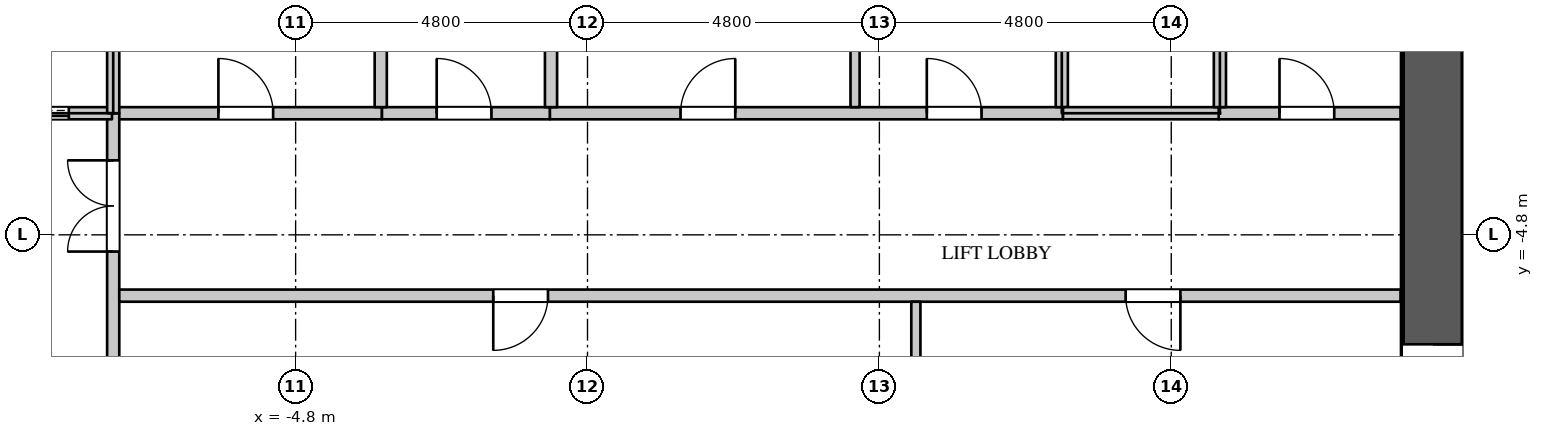
"""IFC4 building model, lengths in metres.
Left out: names, types, materials, properties, quantities, classifications, styles, units other than length and angle.
Written with IfcOpenShell. Run it as: python <this file> out.ifc"""

import sys

from ifc_helpers import new_model, si_unit, direction, frame, frame_2d, origin, place, context, subcontext, project, spatial, rectangle, extrude, element, fill, save


model = new_model("IFC4")
c1 = context("Model", 3, precision=1e-05, world=origin(), true_north=direction((0.0, 1.0)))
c2 = subcontext(c1, "Body", "Model", "MODEL_VIEW")
j1 = project(units=[si_unit("LENGTHUNIT", "METRE"), si_unit("PLANEANGLEUNIT", "RADIAN")], contexts=[c1])
p1 = place(None, origin())
s1 = spatial("IfcSite", under=j1, at=p1, CompositionType="ELEMENT")
p2 = place(p1, origin())
s2 = spatial("IfcBuilding", under=s1, at=p2, CompositionType="ELEMENT")
p3 = place(p2, frame((0.0, 0.0, 101.1)))
s3 = spatial("IfcBuildingStorey", under=s2, at=p3, CompositionType="ELEMENT", Elevation=101.1)
p4 = place(p3, frame((13.9, -11.0, 0.0), z_axis=(0.0, 0.0, 1.0), x_axis=(0.0, 1.0, 0.0)))
e1 = element("IfcWall", 1, at=p4, inside=s3, PredefinedType="SHEAR", context=c2, shape_type="SweptSolid", body=[
    extrude(rectangle(XDim=22.0, YDim=1.0, at=frame_2d((11.0, 0.0))), origin(), (0.0, 0.0, 1.0), 5.4),
])
p5 = place(p4, frame((20.05, 0.0, 0.0)))
e2 = element("IfcOpeningElement", 2, at=p5, cuts=e1, PredefinedType="OPENING", context=c2, shape_type="SweptSolid", body=[
    extrude(rectangle(XDim=1.1, YDim=2.2, at=frame_2d((0.55, 1.1))), frame((0.0, 0.51, 0.0), z_axis=(0.0, -1.0, 0.0), x_axis=(1.0, 0.0, 0.0)), (0.0, 0.0, 1.0), 1.02),
])
p6 = place(p4, frame((14.15, 0.0, 0.0)))
e3 = element("IfcOpeningElement", 3, at=p6, cuts=e1, PredefinedType="OPENING", context=c2, shape_type="SweptSolid", body=[
    extrude(rectangle(XDim=0.9, YDim=2.2, at=frame_2d((0.45, 1.1))), frame((0.0, 0.51, 0.0), z_axis=(0.0, -1.0, 0.0), x_axis=(1.0, 0.0, 0.0)), (0.0, 0.0, 1.0), 1.02),
])
p7 = place(p4, frame((0.85, 0.0, 0.0)))
e4 = element("IfcOpeningElement", 4, at=p7, cuts=e1, PredefinedType="OPENING", context=c2, shape_type="SweptSolid", body=[
    extrude(rectangle(XDim=1.1, YDim=2.2, at=frame_2d((0.55, 1.1))), frame((0.0, 0.51, 0.0), z_axis=(0.0, -1.0, 0.0), x_axis=(1.0, 0.0, 0.0)), (0.0, 0.0, 1.0), 1.02),
])
p8 = place(p4, frame((3.5, 0.0, 0.0)))
e5 = element("IfcOpeningElement", 5, at=p8, cuts=e1, PredefinedType="OPENING", context=c2, shape_type="SweptSolid", body=[
    extrude(rectangle(XDim=0.9, YDim=2.2, at=frame_2d((0.45, 1.1))), frame((0.0, 0.51, 0.0), z_axis=(0.0, -1.0, 0.0), x_axis=(1.0, 0.0, 0.0)), (0.0, 0.0, 1.0), 1.02),
])
p9 = place(p3, frame((-7.82, -2.8, 0.0), z_axis=(0.0, 0.0, 1.0), x_axis=(1.0, 0.0, 0.0)))
e6 = element("IfcWall", 6, at=p9, inside=s3, PredefinedType="PARTITIONING", context=c2, shape_type="SweptSolid", body=[
    extrude(rectangle(XDim=4.44, YDim=0.2, at=frame_2d((2.22, 0.0))), origin(), (0.0, 0.0, 1.0), 5.15),
])
p10 = place(p9, frame((1.75, 0.0, 0.0)))
e7 = element("IfcOpeningElement", 7, at=p10, cuts=e6, PredefinedType="OPENING", context=c2, shape_type="SweptSolid", body=[
    extrude(rectangle(XDim=0.9, YDim=2.2, at=frame_2d((0.45, 1.1))), frame((0.0, 0.11, 0.0), z_axis=(0.0, -1.0, 0.0), x_axis=(1.0, 0.0, 0.0)), (0.0, 0.0, 1.0), 0.22),
])
p11 = place(p3, frame((-7.8, -8.075, 0.0), z_axis=(0.0, 0.0, 1.0), x_axis=(0.0, 1.0, 0.0)))
e8 = element("IfcWall", 8, at=p11, inside=s3, PredefinedType="PARTITIONING", context=c2, shape_type="SweptSolid", body=[
    extrude(rectangle(XDim=5.275, YDim=0.2, at=frame_2d((2.637, 0.0))), origin(), (0.0, 0.0, 1.0), 5.15),
])
p12 = place(p11, frame((3.0, 0.0, 0.0)))
e9 = element("IfcOpeningElement", 9, at=p12, cuts=e8, PredefinedType="OPENING", context=c2, shape_type="SweptSolid", body=[
    extrude(rectangle(XDim=1.5, YDim=2.4, at=frame_2d((0.75, 1.2))), frame((0.0, 0.11, 0.0), z_axis=(0.0, -1.0, 0.0), x_axis=(1.0, 0.0, 0.0)), (0.0, 0.0, 1.0), 0.22),
])
p13 = place(p3, frame((-7.7, -5.8, 0.0), z_axis=(0.0, 0.0, 1.0), x_axis=(1.0, 0.0, 0.0)))
e10 = element("IfcWall", 10, at=p13, inside=s3, PredefinedType="PARTITIONING", context=c2, shape_type="SweptSolid", body=[
    extrude(rectangle(XDim=21.07, YDim=0.2, at=frame_2d((10.535, 0.0))), origin(), (0.0, 0.0, 1.0), 5.15),
])
p14 = place(p13, frame((6.15, 0.0, 0.0)))
e11 = element("IfcOpeningElement", 11, at=p14, cuts=e10, PredefinedType="OPENING", context=c2, shape_type="SweptSolid", body=[
    extrude(rectangle(XDim=0.9, YDim=2.2, at=frame_2d((0.45, 1.1))), frame((0.0, 0.11, 0.0), z_axis=(0.0, -1.0, 0.0), x_axis=(1.0, 0.0, 0.0)), (0.0, 0.0, 1.0), 0.22),
])
p15 = place(p13, frame((16.55, 0.0, 0.0)))
e12 = element("IfcOpeningElement", 12, at=p15, cuts=e10, PredefinedType="OPENING", context=c2, shape_type="SweptSolid", body=[
    extrude(rectangle(XDim=0.9, YDim=2.2, at=frame_2d((0.45, 1.1))), frame((0.0, 0.11, 0.0), z_axis=(0.0, -1.0, 0.0), x_axis=(1.0, 0.0, 0.0)), (0.0, 0.0, 1.0), 0.22),
])
p16 = place(p3, frame((-0.62, -2.8, 0.0), z_axis=(0.0, 0.0, 1.0), x_axis=(1.0, 0.0, 0.0)))
e13 = element("IfcWall", 13, at=p16, inside=s3, PredefinedType="PARTITIONING", context=c2, shape_type="SweptSolid", body=[
    extrude(rectangle(XDim=8.44, YDim=0.2, at=frame_2d((4.22, 0.0))), origin(), (0.0, 0.0, 1.0), 5.15),
])
p17 = place(p16, frame((2.15, 0.0, 0.0)))
e14 = element("IfcOpeningElement", 14, at=p17, cuts=e13, PredefinedType="OPENING", context=c2, shape_type="SweptSolid", body=[
    extrude(rectangle(XDim=0.9, YDim=2.2, at=frame_2d((0.45, 1.1))), frame((0.0, 0.11, 0.0), z_axis=(0.0, -1.0, 0.0), x_axis=(1.0, 0.0, 0.0)), (0.0, 0.0, 1.0), 0.22),
])
p18 = place(p16, frame((6.2, 0.0, 0.0)))
e15 = element("IfcOpeningElement", 15, at=p18, cuts=e13, PredefinedType="OPENING", context=c2, shape_type="SweptSolid", body=[
    extrude(rectangle(XDim=0.9, YDim=2.2, at=frame_2d((0.45, 1.1))), frame((0.0, 0.11, 0.0), z_axis=(0.0, -1.0, 0.0), x_axis=(1.0, 0.0, 0.0)), (0.0, 0.0, 1.0), 0.22),
])
p19 = place(p3, frame((4.4, -2.7, 0.0), z_axis=(0.0, 0.0, 1.0), x_axis=(0.0, 1.0, 0.0)))
e16 = element("IfcWall", 16, at=p19, inside=s3, PredefinedType="PARTITIONING", context=c2, shape_type="SweptSolid", body=[
    extrude(rectangle(XDim=2.6, YDim=0.15, at=frame_2d((1.3, 0.0))), origin(), (0.0, 0.0, 1.0), 5.15),
])
p20 = place(p3, frame((5.4, -8.2, 0.0), z_axis=(0.0, 0.0, 1.0), x_axis=(0.0, 1.0, 0.0)))
e17 = element("IfcWall", 17, at=p20, inside=s3, PredefinedType="PARTITIONING", context=c2, shape_type="SweptSolid", body=[
    extrude(rectangle(XDim=2.3, YDim=0.15, at=frame_2d((1.15, 0.0))), origin(), (0.0, 0.0, 1.0), 5.15),
])
p21 = place(p3, frame((-3.38, -2.8, 0.0), z_axis=(0.0, 0.0, 1.0), x_axis=(1.0, 0.0, 0.0)))
e18 = element("IfcWall", 18, at=p21, inside=s3, PredefinedType="PARTITIONING", context=c2, shape_type="SweptSolid", body=[
    extrude(rectangle(XDim=2.76, YDim=0.2, at=frame_2d((1.38, 0.0))), origin(), (0.0, 0.0, 1.0), 5.15),
])
p22 = place(p21, frame((0.9, 0.0, 0.0)))
e19 = element("IfcOpeningElement", 19, at=p22, cuts=e18, PredefinedType="OPENING", context=c2, shape_type="SweptSolid", body=[
    extrude(rectangle(XDim=0.9, YDim=2.2, at=frame_2d((0.45, 1.1))), frame((0.0, 0.11, 0.0), z_axis=(0.0, -1.0, 0.0), x_axis=(1.0, 0.0, 0.0)), (0.0, 0.0, 1.0), 0.22),
])
for number, where, z_axis, x_axis in (
    (20, (-3.4, -2.7, 0.0), (0.0, 0.0, 1.0), (0.0, 1.0, 0.0)),
    (21, (-0.6, -2.7, 0.0), (0.0, 0.0, 1.0), (0.0, 1.0, 0.0)),
):
    element("IfcWall", number, at=place(p3, frame(where, z_axis=z_axis, x_axis=x_axis)), inside=s3, PredefinedType="PARTITIONING", context=c2, shape_type="SweptSolid", body=[
        extrude(rectangle(XDim=2.6, YDim=0.2, at=frame_2d((1.3, 0.0))), origin(), (0.0, 0.0, 1.0), 5.15),
    ])
p23 = place(p3, frame((10.38, -2.8, 0.0), z_axis=(0.0, 0.0, 1.0), x_axis=(1.0, 0.0, 0.0)))
e22 = element("IfcWall", 22, at=p23, inside=s3, PredefinedType="PARTITIONING", context=c2, shape_type="SweptSolid", body=[
    extrude(rectangle(XDim=2.99, YDim=0.2, at=frame_2d((1.495, 0.0))), origin(), (0.0, 0.0, 1.0), 5.15),
])
p24 = place(p23, frame((1.0, 0.0, 0.0)))
e23 = element("IfcOpeningElement", 23, at=p24, cuts=e22, PredefinedType="OPENING", context=c2, shape_type="SweptSolid", body=[
    extrude(rectangle(XDim=0.9, YDim=2.2, at=frame_2d((0.45, 1.1))), frame((0.0, 0.11, 0.0), z_axis=(0.0, -1.0, 0.0), x_axis=(1.0, 0.0, 0.0)), (0.0, 0.0, 1.0), 0.22),
])
p25 = place(p3, frame((-10.38, -2.8, 0.0), z_axis=(0.0, 0.0, 1.0), x_axis=(1.0, 0.0, 0.0)))
e24 = element("IfcWall", 24, at=p25, inside=s3, PredefinedType="PARTITIONING", context=c2, shape_type="SweptSolid", body=[
    extrude(rectangle(XDim=2.56, YDim=0.2, at=frame_2d((1.28, 0.0))), origin(), (0.0, 0.0, 1.0), 5.15),
])
p26 = place(p25, frame((0.75, 0.0, 0.0)))
e25 = element("IfcOpeningElement", 25, at=p26, cuts=e24, PredefinedType="OPENING", context=c2, shape_type="SweptSolid", body=[
    extrude(rectangle(XDim=1.1, YDim=2.2, at=frame_2d((0.55, 1.1))), frame((0.0, 0.11, 0.0), z_axis=(0.0, -1.0, 0.0), x_axis=(1.0, 0.0, 0.0)), (0.0, 0.0, 1.0), 0.22),
])
p27 = place(p3, frame((-7.8, -2.8, 0.0), z_axis=(0.0, 0.0, 1.0), x_axis=(0.0, 1.0, 0.0)))
e26 = element("IfcWall", 26, at=p27, inside=s3, PredefinedType="PARTITIONING", context=c2, shape_type="SweptSolid", body=[
    extrude(rectangle(XDim=2.8, YDim=0.2, at=frame_2d((1.4, 0.0))), origin(), (0.0, 0.0, 1.0), 5.15),
])
p28 = place(p3, frame((7.8, -2.7, 0.0), z_axis=(0.0, 0.0, 1.0), x_axis=(0.0, 1.0, 0.0)))
e27 = element("IfcWall", 27, at=p28, inside=s3, PredefinedType="PARTITIONING", context=c2, shape_type="SweptSolid", body=[
    extrude(rectangle(XDim=2.7, YDim=0.2, at=frame_2d((1.35, 0.0))), origin(), (0.0, 0.0, 1.0), 5.15),
])
p29 = place(p3, frame((7.82, -2.8, 0.0), z_axis=(0.0, 0.0, 1.0), x_axis=(1.0, 0.0, 0.0)))
e28 = element("IfcWall", 28, at=p29, inside=s3, PredefinedType="PARTITIONING", context=c2, shape_type="SweptSolid", body=[
    extrude(rectangle(XDim=2.56, YDim=0.2, at=frame_2d((1.28, 0.0))), origin(), (0.0, 0.0, 1.0), 5.15),
])
p30 = place(p3, frame((10.4, -2.7, 0.0), z_axis=(0.0, 0.0, 1.0), x_axis=(0.0, 1.0, 0.0)))
e29 = element("IfcWall", 29, at=p30, inside=s3, PredefinedType="PARTITIONING", context=c2, shape_type="SweptSolid", body=[
    extrude(rectangle(XDim=5.4, YDim=0.2, at=frame_2d((2.7, 0.0))), origin(), (0.0, 0.0, 1.0), 5.15),
])
p31 = place(p24, origin())
e30 = element("IfcDoor", 30, at=p31, inside=s3, OperationType="SINGLE_SWING_LEFT", PredefinedType="DOOR", context=c2, shape_type="SweptSolid", body=[
    extrude(rectangle(XDim=0.9, YDim=2.2, at=frame_2d((0.45, 1.1))), frame((0.0, 0.025, 0.0), z_axis=(0.0, -1.0, 0.0), x_axis=(1.0, 0.0, 0.0)), (0.0, 0.0, 1.0), 0.05),
])
fill(e23, e30)
p32 = place(p14, origin())
e31 = element("IfcDoor", 31, at=p32, inside=s3, OperationType="SINGLE_SWING_RIGHT", PredefinedType="DOOR", context=c2, shape_type="SweptSolid", body=[
    extrude(rectangle(XDim=0.9, YDim=2.2, at=frame_2d((0.45, 1.1))), frame((0.0, 0.025, 0.0), z_axis=(0.0, -1.0, 0.0), x_axis=(1.0, 0.0, 0.0)), (0.0, 0.0, 1.0), 0.05),
])
fill(e11, e31)
p33 = place(p15, origin())
e32 = element("IfcDoor", 32, at=p33, inside=s3, OperationType="SINGLE_SWING_LEFT", PredefinedType="DOOR", context=c2, shape_type="SweptSolid", body=[
    extrude(rectangle(XDim=0.9, YDim=2.2, at=frame_2d((0.45, 1.1))), frame((0.0, 0.025, 0.0), z_axis=(0.0, -1.0, 0.0), x_axis=(1.0, 0.0, 0.0)), (0.0, 0.0, 1.0), 0.05),
])
fill(e12, e32)
p34 = place(p10, origin())
e33 = element("IfcDoor", 33, at=p34, inside=s3, OperationType="SINGLE_SWING_LEFT", PredefinedType="DOOR", context=c2, shape_type="SweptSolid", body=[
    extrude(rectangle(XDim=0.9, YDim=2.2, at=frame_2d((0.45, 1.1))), frame((0.0, 0.025, 0.0), z_axis=(0.0, -1.0, 0.0), x_axis=(1.0, 0.0, 0.0)), (0.0, 0.0, 1.0), 0.05),
])
fill(e7, e33)
p35 = place(p22, origin())
e34 = element("IfcDoor", 34, at=p35, inside=s3, OperationType="SINGLE_SWING_LEFT", PredefinedType="DOOR", context=c2, shape_type="SweptSolid", body=[
    extrude(rectangle(XDim=0.9, YDim=2.2, at=frame_2d((0.45, 1.1))), frame((0.0, 0.025, 0.0), z_axis=(0.0, -1.0, 0.0), x_axis=(1.0, 0.0, 0.0)), (0.0, 0.0, 1.0), 0.05),
])
fill(e19, e34)
p36 = place(p17, origin())
e35 = element("IfcDoor", 35, at=p36, inside=s3, OperationType="SINGLE_SWING_RIGHT", PredefinedType="DOOR", context=c2, shape_type="SweptSolid", body=[
    extrude(rectangle(XDim=0.9, YDim=2.2, at=frame_2d((0.45, 1.1))), frame((0.0, 0.025, 0.0), z_axis=(0.0, -1.0, 0.0), x_axis=(1.0, 0.0, 0.0)), (0.0, 0.0, 1.0), 0.05),
])
fill(e14, e35)
p37 = place(p18, origin())
e36 = element("IfcDoor", 36, at=p37, inside=s3, OperationType="SINGLE_SWING_LEFT", PredefinedType="DOOR", context=c2, shape_type="SweptSolid", body=[
    extrude(rectangle(XDim=0.9, YDim=2.2, at=frame_2d((0.45, 1.1))), frame((0.0, 0.025, 0.0), z_axis=(0.0, -1.0, 0.0), x_axis=(1.0, 0.0, 0.0)), (0.0, 0.0, 1.0), 0.05),
])
fill(e15, e36)
p38 = place(p26, origin())
e37 = element("IfcDoor", 37, at=p38, inside=s3, OperationType="DOUBLE_DOOR_SLIDING", PredefinedType="DOOR", context=c2, shape_type="SweptSolid", body=[
    extrude(rectangle(XDim=1.1, YDim=2.2, at=frame_2d((0.55, 1.1))), frame((0.0, 0.025, 0.0), z_axis=(0.0, -1.0, 0.0), x_axis=(1.0, 0.0, 0.0)), (0.0, 0.0, 1.0), 0.05),
])
fill(e25, e37)
p39 = place(p12, origin())
e38 = element("IfcDoor", 38, at=p39, inside=s3, OperationType="DOUBLE_DOOR_SINGLE_SWING", PredefinedType="DOOR", context=c2, shape_type="SweptSolid", body=[
    extrude(rectangle(XDim=1.5, YDim=2.4, at=frame_2d((0.75, 1.2))), frame((0.0, 0.025, 0.0), z_axis=(0.0, -1.0, 0.0), x_axis=(1.0, 0.0, 0.0)), (0.0, 0.0, 1.0), 0.05),
])
fill(e9, e38)
p40 = place(p8, origin())
e39 = element("IfcDoor", 39, at=p40, inside=s3, OperationType="SINGLE_SWING_LEFT", PredefinedType="DOOR", context=c2, shape_type="SweptSolid", body=[
    extrude(rectangle(XDim=0.9, YDim=2.2, at=frame_2d((0.45, 1.1))), frame((0.0, -0.445, 0.0), z_axis=(0.0, -1.0, 0.0), x_axis=(1.0, 0.0, 0.0)), (0.0, 0.0, 1.0), 0.05),
])
fill(e5, e39)
save(model, sys.argv[1])
